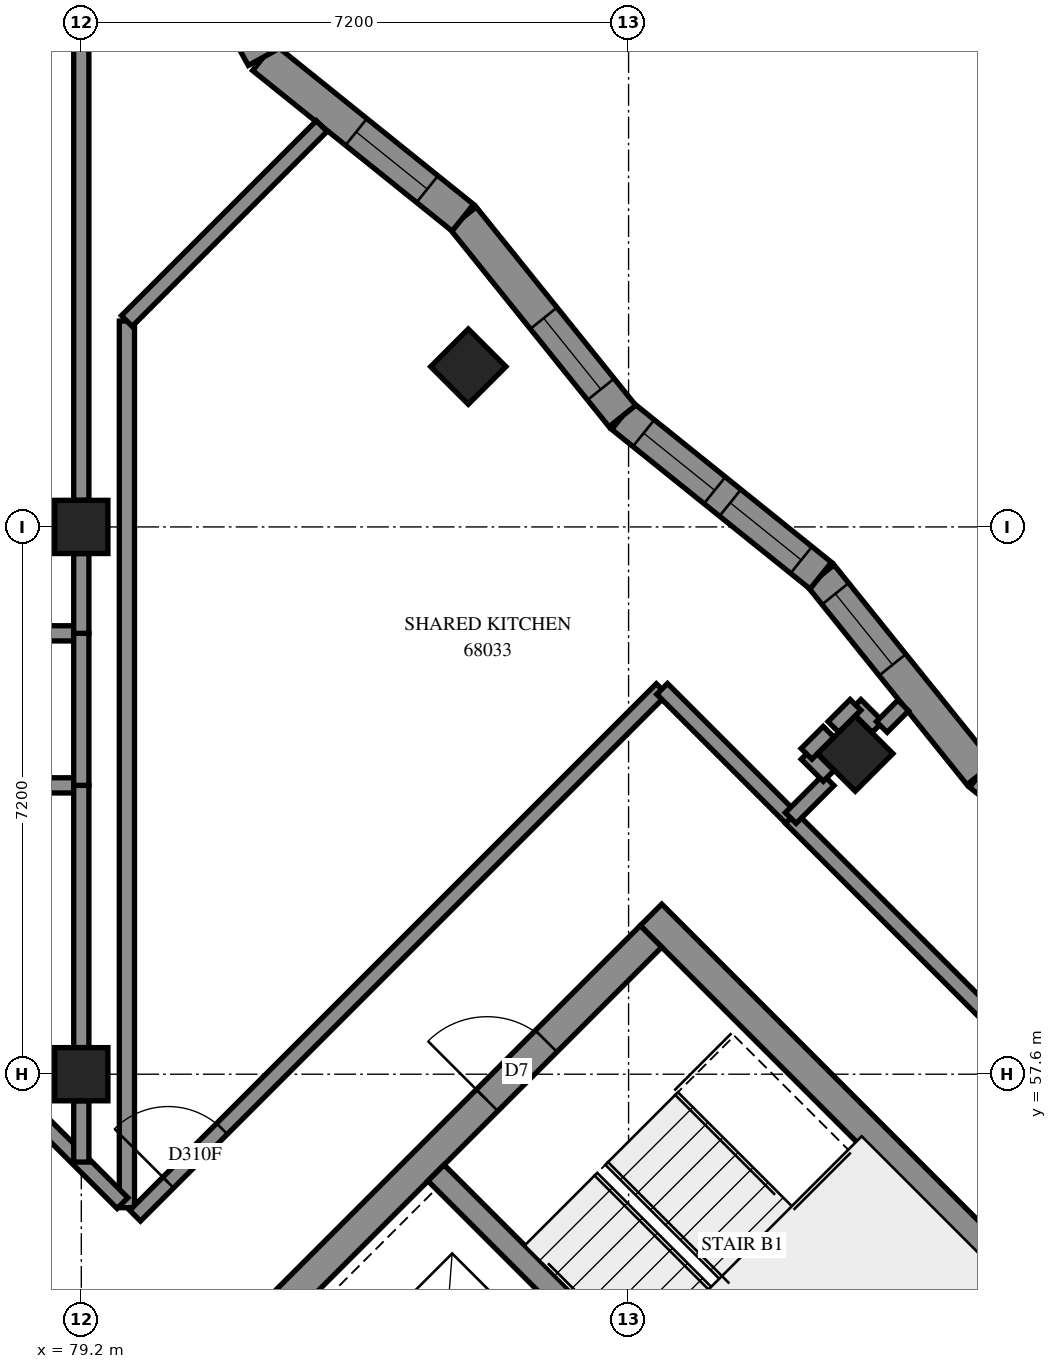
"""IFC4 building model, lengths in metres.
Left out: names, types, materials, properties, quantities, classifications, styles, units other than length and angle.
Written with IfcOpenShell. Run it as: python <this file> out.ifc"""

import sys

from ifc_helpers import new_model, si_unit, direction, frame, frame_2d, origin, origin_2d, place, context, subcontext, project, spatial, polyline, rectangle, outline, extrude, element, fill, save


model = new_model("IFC4")
c1 = context("Model", 3, precision=1e-05, world=origin(), true_north=direction((0.0, 1.0)))
c2 = subcontext(c1, "Body", "Model", "MODEL_VIEW")
j1 = project(units=[si_unit("LENGTHUNIT", "METRE"), si_unit("PLANEANGLEUNIT", "RADIAN")], contexts=[c1])
p1 = place(None, origin())
s1 = spatial("IfcSite", under=j1, at=p1, CompositionType="ELEMENT")
p2 = place(p1, origin())
s2 = spatial("IfcBuilding", under=s1, at=p2, CompositionType="ELEMENT")
p3 = place(p2, frame((0.0, 0.0, 250.6)))
s3 = spatial("IfcBuildingStorey", under=s2, at=p3, CompositionType="ELEMENT", Elevation=250.6)
for number, where, z_axis, x_axis in (
    (1, (79.2, 57.6, 0.0), (0.0, 0.0, 1.0), (1.0, 0.0, 0.0)),
    (2, (79.2, 64.8, 0.0), (0.0, 0.0, 1.0), (1.0, 0.0, 0.0)),
    (3, (84.291, 66.909, 0.0), (0.0, 0.0, 1.0), (0.707, -0.707, 0.0)),
    (4, (89.382, 61.818, 0.0), (0.0, 0.0, 1.0), (0.707, -0.707, 0.0)),
):
    element("IfcColumn", number, at=place(p3, frame(where, z_axis=z_axis, x_axis=x_axis)), inside=s3, PredefinedType="COLUMN", context=c2, shape_type="SweptSolid", body=[
        extrude(rectangle(XDim=0.7, YDim=0.7, at=origin_2d()), origin(), (0.0, 0.0, 1.0), 3.1),
    ])
p4 = place(p3, frame((86.695, 59.696, -0.3), z_axis=(0.0, 0.0, 1.0), x_axis=(0.7071100706, -0.7071034917, 0.0)))
e5 = element("IfcWall", 5, at=p4, inside=s3, PredefinedType="SHEAR", context=c2, shape_type="SweptSolid", body=[
    extrude(rectangle(XDim=15.2, YDim=0.4, at=frame_2d((7.6, 0.0))), origin(), (0.0, 0.0, 1.0), 2.7),
])
p5 = place(p4, frame((10.4, 0.0, 0.3)))
e6 = element("IfcOpeningElement", 6, at=p5, cuts=e5, PredefinedType="OPENING", context=c2, shape_type="SweptSolid", body=[
    extrude(rectangle(XDim=0.8, YDim=2.1, at=frame_2d((0.4, 1.05))), frame((0.0, 0.21, 0.0), z_axis=(0.0, -1.0, 0.0), x_axis=(1.0, 0.0, 0.0)), (0.0, 0.0, 1.0), 0.42),
])
p6 = place(p3, frame((76.513, 49.231, -0.3), z_axis=(0.0, 0.0, 1.0), x_axis=(0.7071067812, 0.7071067812, 0.0)))
e7 = element("IfcWall", 7, at=p6, inside=s3, PredefinedType="SHEAR", context=c2, shape_type="SweptSolid", body=[
    extrude(rectangle(XDim=14.4, YDim=0.4, at=frame_2d((7.2, 0.0))), origin(), (0.0, 0.0, 1.0), 2.7),
])
p7 = place(p6, frame((4.55, 0.0, 0.3)))
e8 = element("IfcOpeningElement", 8, at=p7, cuts=e7, PredefinedType="OPENING", context=c2, shape_type="SweptSolid", body=[
    extrude(rectangle(XDim=1.1, YDim=2.1, at=frame_2d((0.55, 1.05))), frame((0.0, 0.21, 0.0), z_axis=(0.0, -1.0, 0.0), x_axis=(1.0, 0.0, 0.0)), (0.0, 0.0, 1.0), 0.42),
])
p8 = place(p6, frame((11.35, 0.0, 0.3)))
e9 = element("IfcOpeningElement", 9, at=p8, cuts=e7, PredefinedType="OPENING", context=c2, shape_type="SweptSolid", body=[
    extrude(rectangle(XDim=1.1, YDim=2.1, at=frame_2d((0.55, 1.05))), frame((0.0, 0.21, 0.0), z_axis=(0.0, -1.0, 0.0), x_axis=(1.0, 0.0, 0.0)), (0.0, 0.0, 1.0), 0.42),
])
p9 = place(p3, frame((83.867, 56.302, 0.0), z_axis=(0.0, 0.0, 1.0), x_axis=(0.7071137256, -0.7070998367, 0.0)))
e10 = element("IfcWall", 10, at=p9, inside=s3, PredefinedType="SOLIDWALL", context=c2, shape_type="SweptSolid", body=[
    extrude(rectangle(XDim=7.2, YDim=0.3, at=frame_2d((3.6, 0.0))), origin(), (0.0, 0.0, 1.0), 3.1),
])
p10 = place(p3, frame((93.637, 59.451, 0.0), z_axis=(0.0, 0.0, 1.0), x_axis=(-0.7792026718, 0.6267720449, 0.0)))
e11 = element("IfcWall", 11, at=p10, inside=s3, PredefinedType="SOLIDWALL", context=c2, shape_type="SweptSolid", body=[
    extrude(outline(polyline([(-0.024, -0.225), (3.325, -0.225), (3.373, 0.225), (0.024, 0.225), (-0.024, -0.225)])), origin(), (0.0, 0.0, 1.0), 3.1),
])
p11 = place(p10, frame((1.519, 0.0, 0.45)))
e12 = element("IfcOpeningElement", 12, at=p11, cuts=e11, PredefinedType="OPENING", context=c2, shape_type="SweptSolid", body=[
    extrude(rectangle(XDim=1.2, YDim=2.55, at=frame_2d((0.6, 1.275))), frame((0.0, 0.235, 0.0), z_axis=(0.0, -1.0, 0.0), x_axis=(1.0, 0.0, 0.0)), (0.0, 0.0, 1.0), 0.47),
])
p12 = place(p3, frame((91.027, 61.55, 0.0), z_axis=(0.0, 0.0, 1.0), x_axis=(-0.6267866278, 0.7791909414, 0.0)))
e13 = element("IfcWall", 13, at=p12, inside=s3, PredefinedType="SOLIDWALL", context=c2, shape_type="SweptSolid", body=[
    extrude(outline(polyline([(0.024, -0.225), (3.373, -0.225), (3.325, 0.225), (-0.024, 0.225), (0.024, -0.225)])), origin(), (0.0, 0.0, 1.0), 3.1),
])
p13 = place(p12, frame((1.843, 0.0, 0.45)))
e14 = element("IfcOpeningElement", 14, at=p13, cuts=e13, PredefinedType="OPENING", context=c2, shape_type="SweptSolid", body=[
    extrude(rectangle(XDim=1.2, YDim=2.55, at=frame_2d((0.6, 1.275))), frame((0.0, 0.235, 0.0), z_axis=(0.0, -1.0, 0.0), x_axis=(1.0, 0.0, 0.0)), (0.0, 0.0, 1.0), 0.47),
])
p14 = place(p3, frame((88.928, 64.159, 0.0), z_axis=(0.0, 0.0, 1.0), x_axis=(-0.7792026718, 0.6267720449, 0.0)))
e15 = element("IfcWall", 15, at=p14, inside=s3, PredefinedType="SOLIDWALL", context=c2, shape_type="SweptSolid", body=[
    extrude(outline(polyline([(-0.024, -0.225), (3.325, -0.225), (3.373, 0.225), (0.024, 0.225), (-0.024, -0.225)])), origin(), (0.0, 0.0, 1.0), 3.1),
])
p15 = place(p14, frame((0.328, 0.0, 0.45)))
e16 = element("IfcOpeningElement", 16, at=p15, cuts=e15, PredefinedType="OPENING", context=c2, shape_type="SweptSolid", body=[
    extrude(rectangle(XDim=1.2, YDim=2.55, at=frame_2d((0.6, 1.275))), frame((0.0, 0.235, 0.0), z_axis=(0.0, -1.0, 0.0), x_axis=(1.0, 0.0, 0.0)), (0.0, 0.0, 1.0), 0.47),
])
p16 = place(p14, frame((1.791, 0.0, 0.45)))
e17 = element("IfcOpeningElement", 17, at=p16, cuts=e15, PredefinedType="OPENING", context=c2, shape_type="SweptSolid", body=[
    extrude(rectangle(XDim=1.2, YDim=2.55, at=frame_2d((0.6, 1.275))), frame((0.0, 0.235, 0.0), z_axis=(0.0, -1.0, 0.0), x_axis=(1.0, 0.0, 0.0)), (0.0, 0.0, 1.0), 0.47),
])
p17 = place(p3, frame((86.319, 66.258, 0.0), z_axis=(0.0, 0.0, 1.0), x_axis=(-0.6267539152, 0.7792172545, 0.0)))
e18 = element("IfcWall", 18, at=p17, inside=s3, PredefinedType="SOLIDWALL", context=c2, shape_type="SweptSolid", body=[
    extrude(outline(polyline([(0.024, -0.225), (3.373, -0.225), (3.325, 0.225), (-0.024, 0.225), (0.024, -0.225)])), origin(), (0.0, 0.0, 1.0), 3.1),
])
p18 = place(p17, frame((0.452, 0.0, 0.45)))
e19 = element("IfcOpeningElement", 19, at=p18, cuts=e18, PredefinedType="OPENING", context=c2, shape_type="SweptSolid", body=[
    extrude(rectangle(XDim=1.2, YDim=2.55, at=frame_2d((0.6, 1.275))), frame((0.0, 0.235, 0.0), z_axis=(0.0, -1.0, 0.0), x_axis=(1.0, 0.0, 0.0)), (0.0, 0.0, 1.0), 0.47),
])
p19 = place(p3, frame((84.219, 68.868, 0.0), z_axis=(0.0, 0.0, 1.0), x_axis=(-0.7792125049, 0.6267598202, 0.0)))
e20 = element("IfcWall", 20, at=p19, inside=s3, PredefinedType="SOLIDWALL", context=c2, shape_type="SweptSolid", body=[
    extrude(outline(polyline([(-0.024, -0.225), (3.325, -0.225), (3.413, 0.225), (0.024, 0.225), (-0.024, -0.225)])), origin(), (0.0, 0.0, 1.0), 3.1),
])
p20 = place(p19, frame((0.601, 0.0, 0.45)))
e21 = element("IfcOpeningElement", 21, at=p20, cuts=e20, PredefinedType="OPENING", context=c2, shape_type="SweptSolid", body=[
    extrude(rectangle(XDim=1.2, YDim=2.55, at=frame_2d((0.6, 1.275))), frame((0.0, 0.235, 0.0), z_axis=(0.0, -1.0, 0.0), x_axis=(1.0, 0.0, 0.0)), (0.0, 0.0, 1.0), 0.47),
])
p21 = place(p3, frame((81.594, 70.98, 0.0), z_axis=(0.0, 0.0, 1.0), x_axis=(-0.4832770015, 0.8754674979, 0.0)))
e22 = element("IfcWall", 22, at=p21, inside=s3, PredefinedType="SOLIDWALL", context=c2, shape_type="SweptSolid", body=[
    extrude(outline(polyline([(0.044, -0.225), (3.51, -0.225), (3.163, 0.225), (-0.044, 0.225), (0.044, -0.225)])), origin(), (0.0, 0.0, 1.0), 3.1),
])
p22 = place(p21, frame((0.757, 0.0, 0.45)))
e23 = element("IfcOpeningElement", 23, at=p22, cuts=e22, PredefinedType="OPENING", context=c2, shape_type="SweptSolid", body=[
    extrude(rectangle(XDim=1.2, YDim=2.55, at=frame_2d((0.6, 1.275))), frame((0.0, 0.235, 0.0), z_axis=(0.0, -1.0, 0.0), x_axis=(1.0, 0.0, 0.0)), (0.0, 0.0, 1.0), 0.47),
])
p23 = place(p3, frame((79.8, 55.844, 0.0), z_axis=(0.0, 0.0, 1.0), x_axis=(0.0, 1.0, 0.0)))
e24 = element("IfcWall", 24, at=p23, inside=s3, PredefinedType="PARTITIONING", context=c2, shape_type="SweptSolid", body=[
    extrude(rectangle(XDim=11.664, YDim=0.2, at=frame_2d((5.832, 0.0))), origin(), (0.0, 0.0, 1.0), 3.1),
])
p24 = place(p3, frame((79.907, 55.739, 0.0), z_axis=(0.0, 0.0, 1.0), x_axis=(0.7071067812, 0.7071067812, 0.0)))
e25 = element("IfcWall", 25, at=p24, inside=s3, PredefinedType="PARTITIONING", context=c2, shape_type="SweptSolid", body=[
    extrude(rectangle(XDim=9.798, YDim=0.2, at=frame_2d((4.899, 0.0))), origin(), (0.0, 0.0, 1.0), 3.1),
])
p25 = place(p24, frame((0.617, 0.0, 0.0)))
e26 = element("IfcOpeningElement", 26, at=p25, cuts=e25, PredefinedType="OPENING", context=c2, shape_type="SweptSolid", body=[
    extrude(rectangle(XDim=1.0, YDim=2.1, at=frame_2d((0.5, 1.05))), frame((0.0, 0.11, 0.0), z_axis=(0.0, -1.0, 0.0), x_axis=(1.0, 0.0, 0.0)), (0.0, 0.0, 1.0), 0.22),
])
p26 = place(p3, frame((88.535, 60.971, 0.0), z_axis=(0.0, 0.0, 1.0), x_axis=(0.7069678741, -0.707245661, 0.0)))
e27 = element("IfcWall", 27, at=p26, inside=s3, PredefinedType="PARTITIONING", context=c2, shape_type="SweptSolid", body=[
    extrude(rectangle(XDim=7.2, YDim=0.2, at=frame_2d((3.6, 0.0))), origin(), (0.0, 0.0, 1.0), 3.1),
])
p27 = place(p3, frame((79.2, 65.15, 0.0), z_axis=(0.0, 0.0, 1.0), x_axis=(0.0, 1.0, 0.0)))
e28 = element("IfcWall", 28, at=p27, inside=s3, PredefinedType="PARTITIONING", context=c2, shape_type="SweptSolid", body=[
    extrude(rectangle(XDim=6.5, YDim=0.2, at=frame_2d((3.25, 0.0))), origin(), (0.0, 0.0, 1.0), 3.1),
])
p28 = place(p3, frame((74.246, 61.4, 0.0), z_axis=(0.0, 0.0, 1.0), x_axis=(1.0, 0.0, 0.0)))
e29 = element("IfcWall", 29, at=p28, inside=s3, PredefinedType="PARTITIONING", context=c2, shape_type="SweptSolid", body=[
    extrude(rectangle(XDim=4.954, YDim=0.2, at=frame_2d((2.477, 0.0))), origin(), (0.0, 0.0, 1.0), 3.1),
])
p29 = place(p28, frame((1.17, 0.0, 0.0)))
e30 = element("IfcOpeningElement", 30, at=p29, cuts=e29, PredefinedType="OPENING", context=c2, shape_type="SweptSolid", body=[
    extrude(rectangle(XDim=1.0, YDim=2.1, at=frame_2d((0.5, 1.05))), frame((0.0, 0.11, 0.0), z_axis=(0.0, -1.0, 0.0), x_axis=(1.0, 0.0, 0.0)), (0.0, 0.0, 1.0), 0.22),
])
p30 = place(p3, frame((74.402, 63.4, 0.0), z_axis=(0.0, 0.0, 1.0), x_axis=(1.0, 0.0, 0.0)))
e31 = element("IfcWall", 31, at=p30, inside=s3, PredefinedType="PARTITIONING", context=c2, shape_type="SweptSolid", body=[
    extrude(rectangle(XDim=4.798, YDim=0.2, at=frame_2d((2.399, 0.0))), origin(), (0.0, 0.0, 1.0), 3.1),
])
p31 = place(p30, frame((1.766, 0.0, 0.0)))
e32 = element("IfcOpeningElement", 32, at=p31, cuts=e31, PredefinedType="OPENING", context=c2, shape_type="SweptSolid", body=[
    extrude(rectangle(XDim=1.0, YDim=2.1, at=frame_2d((0.5, 1.05))), frame((0.0, 0.11, 0.0), z_axis=(0.0, -1.0, 0.0), x_axis=(1.0, 0.0, 0.0)), (0.0, 0.0, 1.0), 0.22),
])
p32 = place(p3, frame((76.513, 59.131, 0.0), z_axis=(0.0, 0.0, 1.0), x_axis=(0.7073586681, -0.7068548045, 0.0)))
e33 = element("IfcWall", 33, at=p32, inside=s3, PredefinedType="PARTITIONING", context=c2, shape_type="SweptSolid", body=[
    extrude(rectangle(XDim=4.565, YDim=0.2, at=frame_2d((2.282, 0.0))), origin(), (0.0, 0.0, 1.0), 3.1),
])
p33 = place(p3, frame((79.799, 67.509, 0.0), z_axis=(0.0, 0.0, 1.0), x_axis=(0.7070929906, 0.7071205715, 0.0)))
e34 = element("IfcWall", 34, at=p33, inside=s3, PredefinedType="PARTITIONING", context=c2, shape_type="SweptSolid", body=[
    extrude(rectangle(XDim=3.626, YDim=0.2, at=frame_2d((1.813, 0.0))), origin(), (0.0, 0.0, 1.0), 3.1),
])
p34 = place(p3, frame((79.2, 57.95, 0.0), z_axis=(0.0, 0.0, 1.0), x_axis=(0.0, 1.0, 0.0)))
e35 = element("IfcWall", 35, at=p34, inside=s3, PredefinedType="PARTITIONING", context=c2, shape_type="SweptSolid", body=[
    extrude(rectangle(XDim=3.45, YDim=0.2, at=frame_2d((1.725, 0.0))), origin(), (0.0, 0.0, 1.0), 3.1),
])
p35 = place(p3, frame((86.841, 62.669, 0.0), z_axis=(0.0, 0.0, 1.0), x_axis=(0.7071067812, -0.7071067812, 0.0)))
e36 = element("IfcWall", 36, at=p35, inside=s3, PredefinedType="PARTITIONING", context=c2, shape_type="SweptSolid", body=[
    extrude(rectangle(XDim=2.398, YDim=0.2, at=frame_2d((1.199, 0.0))), origin(), (0.0, 0.0, 1.0), 3.1),
])
p36 = place(p3, frame((79.2, 61.4, 0.0), z_axis=(0.0, 0.0, 1.0), x_axis=(0.0, 1.0, 0.0)))
e37 = element("IfcWall", 37, at=p36, inside=s3, PredefinedType="PARTITIONING", context=c2, shape_type="SweptSolid", body=[
    extrude(rectangle(XDim=2.0, YDim=0.2, at=frame_2d((1.0, 0.0))), origin(), (0.0, 0.0, 1.0), 3.1),
])
p37 = place(p3, frame((79.2, 63.4, 0.0), z_axis=(0.0, 0.0, 1.0), x_axis=(0.0, 1.0, 0.0)))
e38 = element("IfcWall", 38, at=p37, inside=s3, PredefinedType="PARTITIONING", context=c2, shape_type="SweptSolid", body=[
    extrude(rectangle(XDim=1.05, YDim=0.2, at=frame_2d((0.525, 0.0))), origin(), (0.0, 0.0, 1.0), 3.1),
])
p38 = place(p3, frame((79.2, 56.444, 0.0), z_axis=(0.0, 0.0, 1.0), x_axis=(0.0, 1.0, 0.0)))
e39 = element("IfcWall", 39, at=p38, inside=s3, PredefinedType="PARTITIONING", context=c2, shape_type="SweptSolid", body=[
    extrude(rectangle(XDim=0.806, YDim=0.2, at=frame_2d((0.403, 0.0))), origin(), (0.0, 0.0, 1.0), 3.1),
])
p39 = place(p3, frame((88.534, 60.971, 0.0), z_axis=(0.0, 0.0, 1.0), x_axis=(0.7071067812, 0.7071067812, 0.0)))
e40 = element("IfcWall", 40, at=p39, inside=s3, PredefinedType="PARTITIONING", context=c2, shape_type="SweptSolid", body=[
    extrude(rectangle(XDim=0.704, YDim=0.2, at=frame_2d((0.352, 0.0))), origin(), (0.0, 0.0, 1.0), 3.1),
])
for number, where, z_axis, x_axis in (
    (41, (88.743, 61.815, 0.0), (0.0, 0.0, 1.0), (0.707, -0.707, 0.0)),
    (42, (89.386, 62.458, 0.0), (0.0, 0.0, 1.0), (0.707, -0.707, 0.0)),
    (43, (88.741, 61.815, 0.0), (0.0, 0.0, 1.0), (0.707, 0.707, 0.0)),
    (44, (89.095, 62.169, 0.0), (0.0, 0.0, 1.0), (0.707, 0.707, 0.0)),
):
    element("IfcWall", number, at=place(p3, frame(where, z_axis=z_axis, x_axis=x_axis)), inside=s3, PredefinedType="PARTITIONING", context=c2, shape_type="SweptSolid", body=[
        extrude(rectangle(XDim=0.41, YDim=0.2, at=frame_2d((0.205, 0.0))), origin(), (0.0, 0.0, 1.0), 3.1),
    ])
p40 = place(p3, frame((89.731, 62.169, 0.0), z_axis=(0.0, 0.0, 1.0), x_axis=(0.7071067812, 0.7071067812, 0.0)))
e45 = element("IfcWall", 45, at=p40, inside=s3, PredefinedType="PARTITIONING", context=c2, shape_type="SweptSolid", body=[
    extrude(rectangle(XDim=0.399, YDim=0.2, at=frame_2d((0.2, 0.0))), origin(), (0.0, 0.0, 1.0), 3.1),
])
p41 = place(p13, origin())
e46 = element("IfcWindow", 46, at=p41, inside=s3, PartitioningType="SINGLE_PANEL", PredefinedType="WINDOW", context=c2, shape_type="SweptSolid", body=[
    extrude(rectangle(XDim=1.2, YDim=2.55, at=frame_2d((0.6, 1.275))), frame((0.0, 0.205, 0.0), z_axis=(0.0, -1.0, 0.0), x_axis=(1.0, 0.0, 0.0)), (0.0, 0.0, 1.0), 0.06),
])
fill(e14, e46)
p42 = place(p15, origin())
e47 = element("IfcWindow", 47, at=p42, inside=s3, PartitioningType="SINGLE_PANEL", PredefinedType="WINDOW", context=c2, shape_type="SweptSolid", body=[
    extrude(rectangle(XDim=1.2, YDim=2.55, at=frame_2d((0.6, 1.275))), frame((0.0, 0.205, 0.0), z_axis=(0.0, -1.0, 0.0), x_axis=(1.0, 0.0, 0.0)), (0.0, 0.0, 1.0), 0.06),
])
fill(e16, e47)
p43 = place(p16, origin())
e48 = element("IfcWindow", 48, at=p43, inside=s3, PartitioningType="SINGLE_PANEL", PredefinedType="WINDOW", context=c2, shape_type="SweptSolid", body=[
    extrude(rectangle(XDim=1.2, YDim=2.55, at=frame_2d((0.6, 1.275))), frame((0.0, 0.205, 0.0), z_axis=(0.0, -1.0, 0.0), x_axis=(1.0, 0.0, 0.0)), (0.0, 0.0, 1.0), 0.06),
])
fill(e17, e48)
p44 = place(p18, origin())
e49 = element("IfcWindow", 49, at=p44, inside=s3, PartitioningType="SINGLE_PANEL", PredefinedType="WINDOW", context=c2, shape_type="SweptSolid", body=[
    extrude(rectangle(XDim=1.2, YDim=2.55, at=frame_2d((0.6, 1.275))), frame((0.0, 0.205, 0.0), z_axis=(0.0, -1.0, 0.0), x_axis=(1.0, 0.0, 0.0)), (0.0, 0.0, 1.0), 0.06),
])
fill(e19, e49)
p45 = place(p20, origin())
e50 = element("IfcWindow", 50, at=p45, inside=s3, PartitioningType="SINGLE_PANEL", PredefinedType="WINDOW", context=c2, shape_type="SweptSolid", body=[
    extrude(rectangle(XDim=1.2, YDim=2.55, at=frame_2d((0.6, 1.275))), frame((0.0, 0.205, 0.0), z_axis=(0.0, -1.0, 0.0), x_axis=(1.0, 0.0, 0.0)), (0.0, 0.0, 1.0), 0.06),
])
fill(e21, e50)
p46 = place(p8, origin())
e51 = element("IfcDoor", 51, at=p46, inside=s3, OperationType="SINGLE_SWING_LEFT", PredefinedType="DOOR", context=c2, shape_type="SweptSolid", body=[
    extrude(rectangle(XDim=1.1, YDim=2.1, at=frame_2d((0.55, 1.05))), frame((0.0, 0.025, 0.0), z_axis=(0.0, -1.0, 0.0), x_axis=(1.0, 0.0, 0.0)), (0.0, 0.0, 1.0), 0.05),
])
fill(e9, e51)
p47 = place(p25, origin())
e52 = element("IfcDoor", 52, at=p47, inside=s3, OperationType="SINGLE_SWING_RIGHT", PredefinedType="DOOR", context=c2, shape_type="SweptSolid", body=[
    extrude(rectangle(XDim=1.0, YDim=2.1, at=frame_2d((0.5, 1.05))), frame((0.0, 0.025, 0.0), z_axis=(0.0, -1.0, 0.0), x_axis=(1.0, 0.0, 0.0)), (0.0, 0.0, 1.0), 0.05),
])
fill(e26, e52)
save(model, sys.argv[1])
